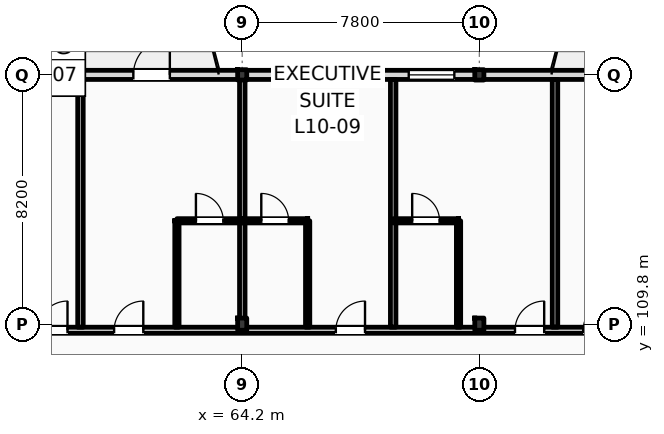
"""IFC4 building model, lengths in metres.
Left out: names, types, materials, properties, quantities, classifications, styles, units other than length and angle.
Written with IfcOpenShell. Run it as: python <this file> out.ifc"""

import sys

from ifc_helpers import new_model, si_unit, direction, frame, frame_2d, origin, origin_2d, place, context, subcontext, project, spatial, rectangle, i_section, extrude, element, fill, save


model = new_model("IFC4")
c1 = context("Model", 3, precision=1e-05, world=origin(), true_north=direction((0.0, 1.0)))
c2 = subcontext(c1, "Body", "Model", "MODEL_VIEW")
j1 = project(units=[si_unit("LENGTHUNIT", "METRE"), si_unit("PLANEANGLEUNIT", "RADIAN")], contexts=[c1])
p1 = place(None, origin())
s1 = spatial("IfcSite", under=j1, at=p1, CompositionType="ELEMENT")
p2 = place(p1, origin())
s2 = spatial("IfcBuilding", under=s1, at=p2, CompositionType="ELEMENT")
p3 = place(p2, frame((0.0, 0.0, 42.6)))
s3 = spatial("IfcBuildingStorey", under=s2, at=p3, CompositionType="ELEMENT", Elevation=42.6)
p4 = place(p3, frame((64.2, 109.8, 0.0), z_axis=(0.0, 0.0, 1.0), x_axis=(1.0, 0.0, 0.0)))
e1 = element("IfcColumn", 1, at=p4, inside=s3, PredefinedType="COLUMN", context=c2, shape_type="SweptSolid", body=[
    extrude(i_section(OverallWidth=0.3, OverallDepth=0.4, WebThickness=0.013, FlangeThickness=0.024, FilletRadius=0.027, at=origin_2d()), origin(), (0.0, 0.0, 1.0), 4.2),
])
p5 = place(p3, frame((64.2, 118.0, 0.0), z_axis=(0.0, 0.0, 1.0), x_axis=(1.0, 0.0, 0.0)))
e2 = element("IfcColumn", 2, at=p5, inside=s3, PredefinedType="COLUMN", context=c2, shape_type="SweptSolid", body=[
    extrude(i_section(OverallWidth=0.3, OverallDepth=0.34, WebThickness=0.012, FlangeThickness=0.021, FilletRadius=0.027, at=origin_2d()), origin(), (0.0, 0.0, 1.0), 4.2),
])
p6 = place(p3, frame((72.0, 109.8, 0.0), z_axis=(0.0, 0.0, 1.0), x_axis=(1.0, 0.0, 0.0)))
e3 = element("IfcColumn", 3, at=p6, inside=s3, PredefinedType="COLUMN", context=c2, shape_type="SweptSolid", body=[
    extrude(i_section(OverallWidth=0.3, OverallDepth=0.4, WebThickness=0.013, FlangeThickness=0.024, FilletRadius=0.027, at=origin_2d()), origin(), (0.0, 0.0, 1.0), 4.2),
])
p7 = place(p3, frame((72.0, 118.0, 0.0), z_axis=(0.0, 0.0, 1.0), x_axis=(1.0, 0.0, 0.0)))
e4 = element("IfcColumn", 4, at=p7, inside=s3, PredefinedType="COLUMN", context=c2, shape_type="SweptSolid", body=[
    extrude(i_section(OverallWidth=0.3, OverallDepth=0.34, WebThickness=0.012, FlangeThickness=0.021, FilletRadius=0.027, at=origin_2d()), origin(), (0.0, 0.0, 1.0), 4.2),
])
p8 = place(p3, frame((22.5, 118.0, 0.0), z_axis=(0.0, 0.0, 1.0), x_axis=(1.0, 0.0, 0.0)))
e5 = element("IfcWall", 5, at=p8, inside=s3, PredefinedType="STANDARD", context=c2, shape_type="SweptSolid", body=[
    extrude(rectangle(XDim=72.9, YDim=0.3, at=frame_2d((36.45, 0.0))), origin(), (0.0, 0.0, 1.0), 3.42),
])
p9 = place(p8, frame((3.611, 0.0, 0.9)))
e6 = element("IfcOpeningElement", 6, at=p9, cuts=e5, PredefinedType="OPENING", context=c2, shape_type="SweptSolid", body=[
    extrude(rectangle(XDim=1.35, YDim=1.75, at=frame_2d((0.675, 0.875))), frame((0.0, 0.16, 0.0), z_axis=(0.0, -1.0, 0.0), x_axis=(1.0, 0.0, 0.0)), (0.0, 0.0, 1.0), 0.32),
])
p10 = place(p8, frame((7.091, 0.0, 0.0)))
e7 = element("IfcOpeningElement", 7, at=p10, cuts=e5, PredefinedType="OPENING", context=c2, shape_type="SweptSolid", body=[
    extrude(rectangle(XDim=1.2, YDim=2.25, at=frame_2d((0.6, 1.125))), frame((0.0, 0.16, 0.0), z_axis=(0.0, -1.0, 0.0), x_axis=(1.0, 0.0, 0.0)), (0.0, 0.0, 1.0), 0.32),
])
p11 = place(p8, frame((12.328, 0.0, 0.9)))
e8 = element("IfcOpeningElement", 8, at=p11, cuts=e5, PredefinedType="OPENING", context=c2, shape_type="SweptSolid", body=[
    extrude(rectangle(XDim=2.0, YDim=2.34, at=frame_2d((1.0, 1.17))), frame((0.0, 0.16, 0.0), z_axis=(0.0, -1.0, 0.0), x_axis=(1.0, 0.0, 0.0)), (0.0, 0.0, 1.0), 0.32),
])
p12 = place(p8, frame((19.12, 0.0, 0.9)))
e9 = element("IfcOpeningElement", 9, at=p12, cuts=e5, PredefinedType="OPENING", context=c2, shape_type="SweptSolid", body=[
    extrude(rectangle(XDim=1.35, YDim=2.34, at=frame_2d((0.675, 1.17))), frame((0.0, 0.16, 0.0), z_axis=(0.0, -1.0, 0.0), x_axis=(1.0, 0.0, 0.0)), (0.0, 0.0, 1.0), 0.32),
])
p13 = place(p8, frame((22.696, 0.0, 0.0)))
e10 = element("IfcOpeningElement", 10, at=p13, cuts=e5, PredefinedType="OPENING", context=c2, shape_type="SweptSolid", body=[
    extrude(rectangle(XDim=1.2, YDim=2.25, at=frame_2d((0.6, 1.125))), frame((0.0, 0.16, 0.0), z_axis=(0.0, -1.0, 0.0), x_axis=(1.0, 0.0, 0.0)), (0.0, 0.0, 1.0), 0.32),
])
p14 = place(p8, frame((27.205, 0.0, 0.9)))
e11 = element("IfcOpeningElement", 11, at=p14, cuts=e5, PredefinedType="OPENING", context=c2, shape_type="SweptSolid", body=[
    extrude(rectangle(XDim=3.1, YDim=2.34, at=frame_2d((1.55, 1.17))), frame((0.0, 0.16, 0.0), z_axis=(0.0, -1.0, 0.0), x_axis=(1.0, 0.0, 0.0)), (0.0, 0.0, 1.0), 0.32),
])
p15 = place(p8, frame((31.948, 0.0, 0.9)))
e12 = element("IfcOpeningElement", 12, at=p15, cuts=e5, PredefinedType="OPENING", context=c2, shape_type="SweptSolid", body=[
    extrude(rectangle(XDim=1.1, YDim=2.34, at=frame_2d((0.55, 1.17))), frame((0.0, 0.16, 0.0), z_axis=(0.0, -1.0, 0.0), x_axis=(1.0, 0.0, 0.0)), (0.0, 0.0, 1.0), 0.32),
])
p16 = place(p8, frame((38.12, 0.0, 0.0)))
e13 = element("IfcOpeningElement", 13, at=p16, cuts=e5, PredefinedType="OPENING", context=c2, shape_type="SweptSolid", body=[
    extrude(rectangle(XDim=1.2, YDim=2.25, at=frame_2d((0.6, 1.125))), frame((0.0, 0.16, 0.0), z_axis=(0.0, -1.0, 0.0), x_axis=(1.0, 0.0, 0.0)), (0.0, 0.0, 1.0), 0.32),
])
p17 = place(p8, frame((43.51, 0.0, 0.9)))
e14 = element("IfcOpeningElement", 14, at=p17, cuts=e5, PredefinedType="OPENING", context=c2, shape_type="SweptSolid", body=[
    extrude(rectangle(XDim=1.35, YDim=1.85, at=frame_2d((0.675, 0.925))), frame((0.0, 0.16, 0.0), z_axis=(0.0, -1.0, 0.0), x_axis=(1.0, 0.0, 0.0)), (0.0, 0.0, 1.0), 0.32),
])
p18 = place(p8, frame((47.178, 0.0, 0.9)))
e15 = element("IfcOpeningElement", 15, at=p18, cuts=e5, PredefinedType="OPENING", context=c2, shape_type="SweptSolid", body=[
    extrude(rectangle(XDim=1.5, YDim=1.9, at=frame_2d((0.75, 0.95))), frame((0.0, 0.16, 0.0), z_axis=(0.0, -1.0, 0.0), x_axis=(1.0, 0.0, 0.0)), (0.0, 0.0, 1.0), 0.32),
])
p19 = place(p8, frame((53.724, 0.0, 0.0)))
e16 = element("IfcOpeningElement", 16, at=p19, cuts=e5, PredefinedType="OPENING", context=c2, shape_type="SweptSolid", body=[
    extrude(rectangle(XDim=1.2, YDim=2.25, at=frame_2d((0.6, 1.125))), frame((0.0, 0.16, 0.0), z_axis=(0.0, -1.0, 0.0), x_axis=(1.0, 0.0, 0.0)), (0.0, 0.0, 1.0), 0.32),
])
p20 = place(p8, frame((58.712, 0.0, 0.9)))
e17 = element("IfcOpeningElement", 17, at=p20, cuts=e5, PredefinedType="OPENING", context=c2, shape_type="SweptSolid", body=[
    extrude(rectangle(XDim=1.8, YDim=2.0, at=frame_2d((0.9, 1.0))), frame((0.0, 0.16, 0.0), z_axis=(0.0, -1.0, 0.0), x_axis=(1.0, 0.0, 0.0)), (0.0, 0.0, 1.0), 0.32),
])
p21 = place(p8, frame((62.781, 0.0, 0.9)))
e18 = element("IfcOpeningElement", 18, at=p21, cuts=e5, PredefinedType="OPENING", context=c2, shape_type="SweptSolid", body=[
    extrude(rectangle(XDim=1.35, YDim=2.05, at=frame_2d((0.675, 1.025))), frame((0.0, 0.16, 0.0), z_axis=(0.0, -1.0, 0.0), x_axis=(1.0, 0.0, 0.0)), (0.0, 0.0, 1.0), 0.32),
])
p22 = place(p8, frame((68.819, 0.0, 0.9)))
e19 = element("IfcOpeningElement", 19, at=p22, cuts=e5, PredefinedType="OPENING", context=c2, shape_type="SweptSolid", body=[
    extrude(rectangle(XDim=2.1, YDim=2.1, at=frame_2d((1.05, 1.05))), frame((0.0, 0.16, 0.0), z_axis=(0.0, -1.0, 0.0), x_axis=(1.0, 0.0, 0.0)), (0.0, 0.0, 1.0), 0.32),
])
p23 = place(p3, frame((10.65, 109.6, 0.0), z_axis=(0.0, 0.0, 1.0), x_axis=(1.0, 0.0, 0.0)))
e20 = element("IfcWall", 20, at=p23, inside=s3, PredefinedType="PARTITIONING", context=c2, shape_type="SweptSolid", body=[
    extrude(rectangle(XDim=84.61, YDim=0.2, at=frame_2d((42.305, 0.0))), origin(), (0.0, 0.0, 1.0), 3.38),
])
p24 = place(p23, frame((15.926, 0.0, 0.0)))
e21 = element("IfcOpeningElement", 21, at=p24, cuts=e20, PredefinedType="OPENING", context=c2, shape_type="SweptSolid", body=[
    extrude(rectangle(XDim=1.02, YDim=2.2, at=frame_2d((0.51, 1.1))), frame((0.0, 0.11, 0.0), z_axis=(0.0, -1.0, 0.0), x_axis=(1.0, 0.0, 0.0)), (0.0, 0.0, 1.0), 0.22),
])
p25 = place(p23, frame((18.45, 0.0, 0.0)))
e22 = element("IfcOpeningElement", 22, at=p25, cuts=e20, PredefinedType="OPENING", context=c2, shape_type="SweptSolid", body=[
    extrude(rectangle(XDim=1.02, YDim=2.2, at=frame_2d((0.51, 1.1))), frame((0.0, 0.11, 0.0), z_axis=(0.0, -1.0, 0.0), x_axis=(1.0, 0.0, 0.0)), (0.0, 0.0, 1.0), 0.22),
])
p26 = place(p23, frame((25.742, 0.0, 0.0)))
e23 = element("IfcOpeningElement", 23, at=p26, cuts=e20, PredefinedType="OPENING", context=c2, shape_type="SweptSolid", body=[
    extrude(rectangle(XDim=1.02, YDim=2.2, at=frame_2d((0.51, 1.1))), frame((0.0, 0.11, 0.0), z_axis=(0.0, -1.0, 0.0), x_axis=(1.0, 0.0, 0.0)), (0.0, 0.0, 1.0), 0.22),
])
p27 = place(p23, frame((31.385, 0.0, 0.0)))
e24 = element("IfcOpeningElement", 24, at=p27, cuts=e20, PredefinedType="OPENING", context=c2, shape_type="SweptSolid", body=[
    extrude(rectangle(XDim=1.02, YDim=2.2, at=frame_2d((0.51, 1.1))), frame((0.0, 0.11, 0.0), z_axis=(0.0, -1.0, 0.0), x_axis=(1.0, 0.0, 0.0)), (0.0, 0.0, 1.0), 0.22),
])
p28 = place(p23, frame((33.908, 0.0, 0.0)))
e25 = element("IfcOpeningElement", 25, at=p28, cuts=e20, PredefinedType="OPENING", context=c2, shape_type="SweptSolid", body=[
    extrude(rectangle(XDim=0.96, YDim=2.2, at=frame_2d((0.48, 1.1))), frame((0.0, 0.11, 0.0), z_axis=(0.0, -1.0, 0.0), x_axis=(1.0, 0.0, 0.0)), (0.0, 0.0, 1.0), 0.22),
])
p29 = place(p23, frame((41.201, 0.0, 0.0)))
e26 = element("IfcOpeningElement", 26, at=p29, cuts=e20, PredefinedType="OPENING", context=c2, shape_type="SweptSolid", body=[
    extrude(rectangle(XDim=0.96, YDim=2.2, at=frame_2d((0.48, 1.1))), frame((0.0, 0.11, 0.0), z_axis=(0.0, -1.0, 0.0), x_axis=(1.0, 0.0, 0.0)), (0.0, 0.0, 1.0), 0.22),
])
p30 = place(p23, frame((46.844, 0.0, 0.0)))
e27 = element("IfcOpeningElement", 27, at=p30, cuts=e20, PredefinedType="OPENING", context=c2, shape_type="SweptSolid", body=[
    extrude(rectangle(XDim=0.96, YDim=2.2, at=frame_2d((0.48, 1.1))), frame((0.0, 0.11, 0.0), z_axis=(0.0, -1.0, 0.0), x_axis=(1.0, 0.0, 0.0)), (0.0, 0.0, 1.0), 0.22),
])
p31 = place(p23, frame((49.337, 0.0, 0.0)))
e28 = element("IfcOpeningElement", 28, at=p31, cuts=e20, PredefinedType="OPENING", context=c2, shape_type="SweptSolid", body=[
    extrude(rectangle(XDim=0.96, YDim=2.2, at=frame_2d((0.48, 1.1))), frame((0.0, 0.11, 0.0), z_axis=(0.0, -1.0, 0.0), x_axis=(1.0, 0.0, 0.0)), (0.0, 0.0, 1.0), 0.22),
])
p32 = place(p23, frame((56.63, 0.0, 0.0)))
e29 = element("IfcOpeningElement", 29, at=p32, cuts=e20, PredefinedType="OPENING", context=c2, shape_type="SweptSolid", body=[
    extrude(rectangle(XDim=0.96, YDim=2.2, at=frame_2d((0.48, 1.1))), frame((0.0, 0.11, 0.0), z_axis=(0.0, -1.0, 0.0), x_axis=(1.0, 0.0, 0.0)), (0.0, 0.0, 1.0), 0.22),
])
p33 = place(p23, frame((62.523, 0.0, 0.0)))
e30 = element("IfcOpeningElement", 30, at=p33, cuts=e20, PredefinedType="OPENING", context=c2, shape_type="SweptSolid", body=[
    extrude(rectangle(XDim=0.96, YDim=2.2, at=frame_2d((0.48, 1.1))), frame((0.0, 0.11, 0.0), z_axis=(0.0, -1.0, 0.0), x_axis=(1.0, 0.0, 0.0)), (0.0, 0.0, 1.0), 0.22),
])
p34 = place(p23, frame((64.765, 0.0, 0.0)))
e31 = element("IfcOpeningElement", 31, at=p34, cuts=e20, PredefinedType="OPENING", context=c2, shape_type="SweptSolid", body=[
    extrude(rectangle(XDim=0.96, YDim=2.2, at=frame_2d((0.48, 1.1))), frame((0.0, 0.11, 0.0), z_axis=(0.0, -1.0, 0.0), x_axis=(1.0, 0.0, 0.0)), (0.0, 0.0, 1.0), 0.22),
])
p35 = place(p23, frame((72.057, 0.0, 0.0)))
e32 = element("IfcOpeningElement", 32, at=p35, cuts=e20, PredefinedType="OPENING", context=c2, shape_type="SweptSolid", body=[
    extrude(rectangle(XDim=0.96, YDim=2.2, at=frame_2d((0.48, 1.1))), frame((0.0, 0.11, 0.0), z_axis=(0.0, -1.0, 0.0), x_axis=(1.0, 0.0, 0.0)), (0.0, 0.0, 1.0), 0.22),
])
p36 = place(p23, frame((74.55, 0.0, 0.0)))
e33 = element("IfcOpeningElement", 33, at=p36, cuts=e20, PredefinedType="OPENING", context=c2, shape_type="SweptSolid", body=[
    extrude(rectangle(XDim=0.96, YDim=2.2, at=frame_2d((0.48, 1.1))), frame((0.0, 0.11, 0.0), z_axis=(0.0, -1.0, 0.0), x_axis=(1.0, 0.0, 0.0)), (0.0, 0.0, 1.0), 0.22),
])
p37 = place(p23, frame((80.163, 0.0, 0.0)))
e34 = element("IfcOpeningElement", 34, at=p37, cuts=e20, PredefinedType="OPENING", context=c2, shape_type="SweptSolid", body=[
    extrude(rectangle(XDim=0.96, YDim=2.2, at=frame_2d((0.48, 1.1))), frame((0.0, 0.11, 0.0), z_axis=(0.0, -1.0, 0.0), x_axis=(1.0, 0.0, 0.0)), (0.0, 0.0, 1.0), 0.22),
])
p38 = place(p23, frame((2.716, 0.0, 0.0)))
e35 = element("IfcOpeningElement", 35, at=p38, cuts=e20, PredefinedType="OPENING", context=c2, shape_type="SweptSolid", body=[
    extrude(rectangle(XDim=1.35, YDim=2.25, at=frame_2d((0.675, 1.125))), frame((0.0, 0.11, 0.0), z_axis=(0.0, -1.0, 0.0), x_axis=(1.0, 0.0, 0.0)), (0.0, 0.0, 1.0), 0.22),
])
p39 = place(p23, frame((6.65, 0.0, 0.0)))
e36 = element("IfcOpeningElement", 36, at=p39, cuts=e20, PredefinedType="OPENING", context=c2, shape_type="SweptSolid", body=[
    extrude(rectangle(XDim=1.35, YDim=2.25, at=frame_2d((0.675, 1.125))), frame((0.0, 0.11, 0.0), z_axis=(0.0, -1.0, 0.0), x_axis=(1.0, 0.0, 0.0)), (0.0, 0.0, 1.0), 0.22),
])
p40 = place(p23, frame((10.583, 0.0, 0.0)))
e37 = element("IfcOpeningElement", 37, at=p40, cuts=e20, PredefinedType="OPENING", context=c2, shape_type="SweptSolid", body=[
    extrude(rectangle(XDim=1.35, YDim=2.25, at=frame_2d((0.675, 1.125))), frame((0.0, 0.11, 0.0), z_axis=(0.0, -1.0, 0.0), x_axis=(1.0, 0.0, 0.0)), (0.0, 0.0, 1.0), 0.22),
])
p41 = place(p3, frame((58.88, 109.7, 0.0), z_axis=(0.0, 0.0, 1.0), x_axis=(0.0, 1.0, 0.0)))
e38 = element("IfcWall", 38, at=p41, inside=s3, PredefinedType="PARTITIONING", context=c2, shape_type="SweptSolid", body=[
    extrude(rectangle(XDim=8.15, YDim=0.18, at=frame_2d((4.075, 0.0))), origin(), (0.0, 0.0, 1.0), 3.63),
])
p42 = place(p3, frame((64.203, 109.7, 0.0), z_axis=(0.0, 0.0, 1.0), x_axis=(0.0, 1.0, 0.0)))
e39 = element("IfcWall", 39, at=p42, inside=s3, PredefinedType="PARTITIONING", context=c2, shape_type="SweptSolid", body=[
    extrude(rectangle(XDim=8.15, YDim=0.18, at=frame_2d((4.075, 0.0))), origin(), (0.0, 0.0, 1.0), 3.57),
])
p43 = place(p3, frame((62.053, 109.7, 0.0), z_axis=(0.0, 0.0, 1.0), x_axis=(0.0, 1.0, 0.0)))
e40 = element("IfcWall", 40, at=p43, inside=s3, PredefinedType="PARTITIONING", context=c2, shape_type="SweptSolid", body=[
    extrude(rectangle(XDim=3.5, YDim=0.14, at=frame_2d((1.75, 0.0))), origin(), (0.0, 0.0, 1.0), 3.94),
])
p44 = place(p3, frame((62.053, 113.2, 0.0), z_axis=(0.0, 0.0, 1.0), x_axis=(1.0, 0.0, 0.0)))
e41 = element("IfcWall", 41, at=p44, inside=s3, PredefinedType="PARTITIONING", context=c2, shape_type="SweptSolid", body=[
    extrude(rectangle(XDim=2.15, YDim=0.14, at=frame_2d((1.075, 0.0))), origin(), (0.0, 0.0, 1.0), 3.94),
])
p45 = place(p44, frame((0.625, 0.0, 0.0)))
e42 = element("IfcOpeningElement", 42, at=p45, cuts=e41, PredefinedType="OPENING", context=c2, shape_type="SweptSolid", body=[
    extrude(rectangle(XDim=0.9, YDim=2.1, at=frame_2d((0.45, 1.05))), frame((0.0, 0.08, 0.0), z_axis=(0.0, -1.0, 0.0), x_axis=(1.0, 0.0, 0.0)), (0.0, 0.0, 1.0), 0.16),
])
p46 = place(p3, frame((69.166, 109.7, 0.0), z_axis=(0.0, 0.0, 1.0), x_axis=(0.0, 1.0, 0.0)))
e43 = element("IfcWall", 43, at=p46, inside=s3, PredefinedType="PARTITIONING", context=c2, shape_type="SweptSolid", body=[
    extrude(rectangle(XDim=8.15, YDim=0.18, at=frame_2d((4.075, 0.0))), origin(), (0.0, 0.0, 1.0), 3.63),
])
p47 = place(p3, frame((66.353, 109.7, 0.0), z_axis=(0.0, 0.0, 1.0), x_axis=(0.0, 1.0, 0.0)))
e44 = element("IfcWall", 44, at=p47, inside=s3, PredefinedType="PARTITIONING", context=c2, shape_type="SweptSolid", body=[
    extrude(rectangle(XDim=3.5, YDim=0.14, at=frame_2d((1.75, 0.0))), origin(), (0.0, 0.0, 1.0), 3.94),
])
p48 = place(p3, frame((64.203, 113.2, 0.0), z_axis=(0.0, 0.0, 1.0), x_axis=(1.0, 0.0, 0.0)))
e45 = element("IfcWall", 45, at=p48, inside=s3, PredefinedType="PARTITIONING", context=c2, shape_type="SweptSolid", body=[
    extrude(rectangle(XDim=2.15, YDim=0.14, at=frame_2d((1.075, 0.0))), origin(), (0.0, 0.0, 1.0), 3.94),
])
p49 = place(p48, frame((0.625, 0.0, 0.0)))
e46 = element("IfcOpeningElement", 46, at=p49, cuts=e45, PredefinedType="OPENING", context=c2, shape_type="SweptSolid", body=[
    extrude(rectangle(XDim=0.9, YDim=2.1, at=frame_2d((0.45, 1.05))), frame((0.0, 0.08, 0.0), z_axis=(0.0, -1.0, 0.0), x_axis=(1.0, 0.0, 0.0)), (0.0, 0.0, 1.0), 0.16),
])
p50 = place(p3, frame((74.489, 109.7, 0.0), z_axis=(0.0, 0.0, 1.0), x_axis=(0.0, 1.0, 0.0)))
e47 = element("IfcWall", 47, at=p50, inside=s3, PredefinedType="PARTITIONING", context=c2, shape_type="SweptSolid", body=[
    extrude(rectangle(XDim=8.15, YDim=0.18, at=frame_2d((4.075, 0.0))), origin(), (0.0, 0.0, 1.0), 3.63),
])
p51 = place(p3, frame((71.316, 109.7, 0.0), z_axis=(0.0, 0.0, 1.0), x_axis=(0.0, 1.0, 0.0)))
e48 = element("IfcWall", 48, at=p51, inside=s3, PredefinedType="PARTITIONING", context=c2, shape_type="SweptSolid", body=[
    extrude(rectangle(XDim=3.5, YDim=0.14, at=frame_2d((1.75, 0.0))), origin(), (0.0, 0.0, 1.0), 3.94),
])
p52 = place(p3, frame((69.166, 113.2, 0.0), z_axis=(0.0, 0.0, 1.0), x_axis=(1.0, 0.0, 0.0)))
e49 = element("IfcWall", 49, at=p52, inside=s3, PredefinedType="PARTITIONING", context=c2, shape_type="SweptSolid", body=[
    extrude(rectangle(XDim=2.15, YDim=0.14, at=frame_2d((1.075, 0.0))), origin(), (0.0, 0.0, 1.0), 3.94),
])
p53 = place(p52, frame((0.625, 0.0, 0.0)))
e50 = element("IfcOpeningElement", 50, at=p53, cuts=e49, PredefinedType="OPENING", context=c2, shape_type="SweptSolid", body=[
    extrude(rectangle(XDim=0.9, YDim=2.1, at=frame_2d((0.45, 1.05))), frame((0.0, 0.08, 0.0), z_axis=(0.0, -1.0, 0.0), x_axis=(1.0, 0.0, 0.0)), (0.0, 0.0, 1.0), 0.16),
])
p54 = place(p16, origin())
e51 = element("IfcDoor", 51, at=p54, inside=s3, OperationType="SINGLE_SWING_RIGHT", PredefinedType="DOOR", context=c2, shape_type="SweptSolid", body=[
    extrude(rectangle(XDim=1.2, YDim=2.25, at=frame_2d((0.6, 1.125))), frame((0.0, 0.025, 0.0), z_axis=(0.0, -1.0, 0.0), x_axis=(1.0, 0.0, 0.0)), (0.0, 0.0, 1.0), 0.05),
])
fill(e13, e51)
p55 = place(p17, origin())
e52 = element("IfcWindow", 52, at=p55, inside=s3, PartitioningType="DOUBLE_PANEL_VERTICAL", PredefinedType="WINDOW", context=c2, shape_type="SweptSolid", body=[
    extrude(rectangle(XDim=1.35, YDim=1.85, at=frame_2d((0.675, 0.925))), frame((0.0, 0.03, 0.0), z_axis=(0.0, -1.0, 0.0), x_axis=(1.0, 0.0, 0.0)), (0.0, 0.0, 1.0), 0.06),
])
fill(e14, e52)
p56 = place(p18, origin())
e53 = element("IfcWindow", 53, at=p56, inside=s3, PartitioningType="DOUBLE_PANEL_VERTICAL", PredefinedType="WINDOW", context=c2, shape_type="SweptSolid", body=[
    extrude(rectangle(XDim=1.5, YDim=1.9, at=frame_2d((0.75, 0.95))), frame((0.0, 0.03, 0.0), z_axis=(0.0, -1.0, 0.0), x_axis=(1.0, 0.0, 0.0)), (0.0, 0.0, 1.0), 0.06),
])
fill(e15, e53)
p57 = place(p30, origin())
e54 = element("IfcDoor", 54, at=p57, inside=s3, OperationType="SINGLE_SWING_RIGHT", PredefinedType="DOOR", context=c2, shape_type="SweptSolid", body=[
    extrude(rectangle(XDim=0.96, YDim=2.2, at=frame_2d((0.48, 1.1))), frame((0.0, 0.025, 0.0), z_axis=(0.0, -1.0, 0.0), x_axis=(1.0, 0.0, 0.0)), (0.0, 0.0, 1.0), 0.05),
])
fill(e27, e54)
p58 = place(p31, origin())
e55 = element("IfcDoor", 55, at=p58, inside=s3, OperationType="SINGLE_SWING_RIGHT", PredefinedType="DOOR", context=c2, shape_type="SweptSolid", body=[
    extrude(rectangle(XDim=0.96, YDim=2.2, at=frame_2d((0.48, 1.1))), frame((0.0, 0.025, 0.0), z_axis=(0.0, -1.0, 0.0), x_axis=(1.0, 0.0, 0.0)), (0.0, 0.0, 1.0), 0.05),
])
fill(e28, e55)
p59 = place(p45, origin())
e56 = element("IfcDoor", 56, at=p59, inside=s3, OperationType="SINGLE_SWING_LEFT", PredefinedType="DOOR", context=c2, shape_type="SweptSolid", body=[
    extrude(rectangle(XDim=0.9, YDim=2.1, at=frame_2d((0.45, 1.05))), frame((0.0, 0.025, 0.0), z_axis=(0.0, -1.0, 0.0), x_axis=(1.0, 0.0, 0.0)), (0.0, 0.0, 1.0), 0.05),
])
fill(e42, e56)
p60 = place(p32, origin())
e57 = element("IfcDoor", 57, at=p60, inside=s3, OperationType="SINGLE_SWING_RIGHT", PredefinedType="DOOR", context=c2, shape_type="SweptSolid", body=[
    extrude(rectangle(XDim=0.96, YDim=2.2, at=frame_2d((0.48, 1.1))), frame((0.0, 0.025, 0.0), z_axis=(0.0, -1.0, 0.0), x_axis=(1.0, 0.0, 0.0)), (0.0, 0.0, 1.0), 0.05),
])
fill(e29, e57)
p61 = place(p49, origin())
e58 = element("IfcDoor", 58, at=p61, inside=s3, OperationType="SINGLE_SWING_LEFT", PredefinedType="DOOR", context=c2, shape_type="SweptSolid", body=[
    extrude(rectangle(XDim=0.9, YDim=2.1, at=frame_2d((0.45, 1.05))), frame((0.0, 0.025, 0.0), z_axis=(0.0, -1.0, 0.0), x_axis=(1.0, 0.0, 0.0)), (0.0, 0.0, 1.0), 0.05),
])
fill(e46, e58)
p62 = place(p33, origin())
e59 = element("IfcDoor", 59, at=p62, inside=s3, OperationType="SINGLE_SWING_RIGHT", PredefinedType="DOOR", context=c2, shape_type="SweptSolid", body=[
    extrude(rectangle(XDim=0.96, YDim=2.2, at=frame_2d((0.48, 1.1))), frame((0.0, 0.025, 0.0), z_axis=(0.0, -1.0, 0.0), x_axis=(1.0, 0.0, 0.0)), (0.0, 0.0, 1.0), 0.05),
])
fill(e30, e59)
p63 = place(p53, origin())
e60 = element("IfcDoor", 60, at=p63, inside=s3, OperationType="SINGLE_SWING_LEFT", PredefinedType="DOOR", context=c2, shape_type="SweptSolid", body=[
    extrude(rectangle(XDim=0.9, YDim=2.1, at=frame_2d((0.45, 1.05))), frame((0.0, 0.025, 0.0), z_axis=(0.0, -1.0, 0.0), x_axis=(1.0, 0.0, 0.0)), (0.0, 0.0, 1.0), 0.05),
])
fill(e50, e60)
p64 = place(p34, origin())
e61 = element("IfcDoor", 61, at=p64, inside=s3, OperationType="SINGLE_SWING_RIGHT", PredefinedType="DOOR", context=c2, shape_type="SweptSolid", body=[
    extrude(rectangle(XDim=0.96, YDim=2.2, at=frame_2d((0.48, 1.1))), frame((0.0, 0.025, 0.0), z_axis=(0.0, -1.0, 0.0), x_axis=(1.0, 0.0, 0.0)), (0.0, 0.0, 1.0), 0.05),
])
fill(e31, e61)
save(model, sys.argv[1])
